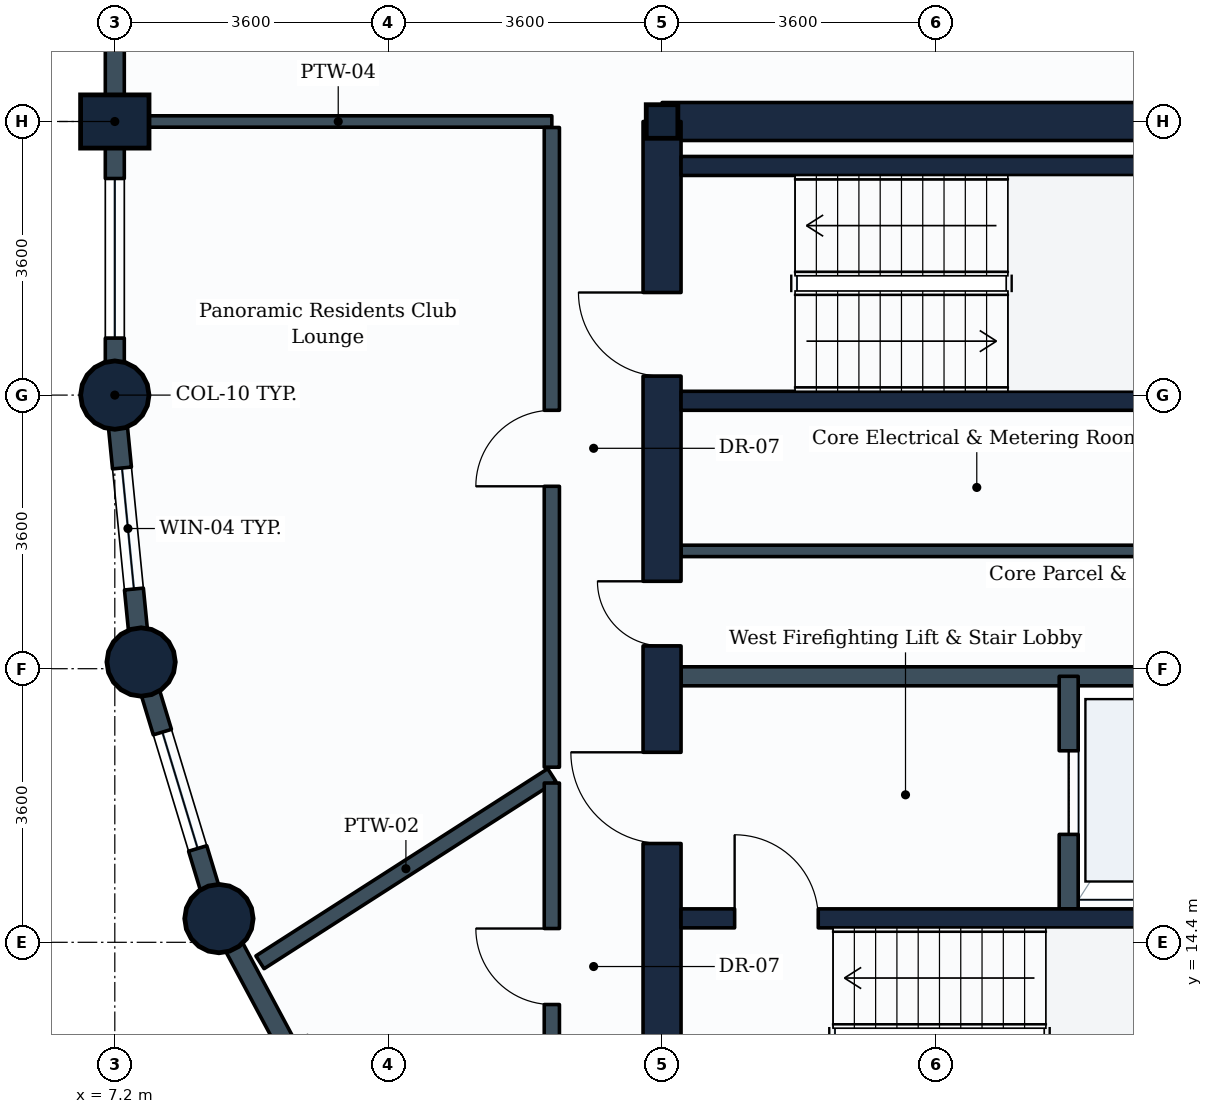
"""IFC4 building model, lengths in metres.
Left out: names, types, materials, properties, quantities, classifications, styles, units other than length and angle.
Written with IfcOpenShell. Run it as: python <this file> out.ifc"""

import sys

from ifc_helpers import new_model, si_unit, direction, frame, frame_2d, origin, origin_2d, place, context, subcontext, project, spatial, rectangle, circle, i_section, extrude, element, fill, save


model = new_model("IFC4")
c1 = context("Model", 3, precision=1e-05, world=origin(), true_north=direction((0.0, 1.0)))
c2 = subcontext(c1, "Body", "Model", "MODEL_VIEW")
j1 = project(units=[si_unit("LENGTHUNIT", "METRE"), si_unit("PLANEANGLEUNIT", "RADIAN")], contexts=[c1])
p1 = place(None, origin())
s1 = spatial("IfcSite", under=j1, at=p1, CompositionType="ELEMENT")
p2 = place(p1, origin())
s2 = spatial("IfcBuilding", under=s1, at=p2, CompositionType="ELEMENT")
p3 = place(p2, frame((0.0, 0.0, 178.6)))
s3 = spatial("IfcBuildingStorey", under=s2, at=p3, CompositionType="ELEMENT", Elevation=178.6)
p4 = place(p3, frame((7.2, 21.6, 0.0), z_axis=(0.0, 0.0, 1.0), x_axis=(1.0, 0.0, 0.0)))
e1 = element("IfcColumn", 1, at=p4, inside=s3, PredefinedType="COLUMN", context=c2, shape_type="SweptSolid", body=[
    extrude(circle(Radius=0.45, at=origin_2d()), origin(), (0.0, 0.0, 1.0), 3.8),
])
p5 = place(p3, frame((7.2, 25.2, 0.0), z_axis=(0.0, 0.0, 1.0), x_axis=(0.0, 1.0, 0.0)))
e2 = element("IfcColumn", 2, at=p5, inside=s3, PredefinedType="COLUMN", context=c2, shape_type="SweptSolid", body=[
    extrude(rectangle(XDim=0.7, YDim=0.9, at=origin_2d()), origin(), (0.0, 0.0, 1.0), 3.8),
])
for number, where, z_axis, x_axis in (
    (3, (7.546, 18.088, 0.0), (0.0, 0.0, 1.0), (1.0, 0.0, 0.0)),
    (4, (8.57, 14.712, 0.0), (0.0, 0.0, 1.0), (1.0, 0.0, 0.0)),
):
    element("IfcColumn", number, at=place(p3, frame(where, z_axis=z_axis, x_axis=x_axis)), inside=s3, PredefinedType="COLUMN", context=c2, shape_type="SweptSolid", body=[
        extrude(circle(Radius=0.45, at=origin_2d()), origin(), (0.0, 0.0, 1.0), 3.8),
    ])
p6 = place(p3, frame((14.4, 25.2, 0.0), z_axis=(0.0, 0.0, 1.0), x_axis=(1.0, 0.0, 0.0)))
e5 = element("IfcColumn", 5, at=p6, inside=s3, PredefinedType="COLUMN", context=c2, shape_type="SweptSolid", body=[
    extrude(i_section(OverallWidth=0.416, OverallDepth=0.442, WebThickness=0.025, FlangeThickness=0.041, FilletRadius=0.015, at=origin_2d()), origin(), (0.0, 0.0, 1.0), 3.8),
])
p7 = place(p3, frame((7.2, 25.2, 0.0), z_axis=(0.0, 0.0, 1.0), x_axis=(0.0, 1.0, 0.0)))
e6 = element("IfcWall", 6, at=p7, inside=s3, PredefinedType="STANDARD", context=c2, shape_type="SweptSolid", body=[
    extrude(rectangle(XDim=3.6, YDim=0.25, at=frame_2d((1.8, 0.0))), origin(), (0.0, 0.0, 1.0), 2.93),
])
p8 = place(p3, frame((7.2, 21.6, 0.0), z_axis=(0.0, 0.0, 1.0), x_axis=(0.0, 1.0, 0.0)))
e7 = element("IfcWall", 7, at=p8, inside=s3, PredefinedType="STANDARD", context=c2, shape_type="SweptSolid", body=[
    extrude(rectangle(XDim=3.6, YDim=0.25, at=frame_2d((1.8, 0.0))), origin(), (0.0, 0.0, 1.0), 2.93),
])
p9 = place(p8, frame((0.75, 0.0, 0.85)))
e8 = element("IfcOpeningElement", 8, at=p9, cuts=e7, PredefinedType="OPENING", context=c2, shape_type="SweptSolid", body=[
    extrude(rectangle(XDim=2.1, YDim=1.35, at=frame_2d((1.05, 0.675))), frame((0.0, 0.135, 0.0), z_axis=(0.0, -1.0, 0.0), x_axis=(1.0, 0.0, 0.0)), (0.0, 0.0, 1.0), 0.27),
])
p10 = place(p3, frame((7.546, 18.088, 0.0), z_axis=(0.0, 0.0, 1.0), x_axis=(-0.09802417461, 0.995184033831, 0.0)))
e9 = element("IfcWall", 9, at=p10, inside=s3, PredefinedType="STANDARD", context=c2, shape_type="SweptSolid", body=[
    extrude(rectangle(XDim=3.529, YDim=0.25, at=frame_2d((1.765, 0.0))), origin(), (0.0, 0.0, 1.0), 2.93),
])
p11 = place(p10, frame((0.965, 0.0, 0.85)))
e10 = element("IfcOpeningElement", 10, at=p11, cuts=e9, PredefinedType="OPENING", context=c2, shape_type="SweptSolid", body=[
    extrude(rectangle(XDim=1.6, YDim=1.35, at=frame_2d((0.8, 0.675))), frame((0.0, 0.135, 0.0), z_axis=(0.0, -1.0, 0.0), x_axis=(1.0, 0.0, 0.0)), (0.0, 0.0, 1.0), 0.27),
])
p12 = place(p3, frame((8.57, 14.712, 0.0), z_axis=(0.0, 0.0, 1.0), x_axis=(-0.290305086481, 0.956934144423, 0.0)))
e11 = element("IfcWall", 11, at=p12, inside=s3, PredefinedType="STANDARD", context=c2, shape_type="SweptSolid", body=[
    extrude(rectangle(XDim=3.528, YDim=0.25, at=frame_2d((1.764, 0.0))), origin(), (0.0, 0.0, 1.0), 2.93),
])
p13 = place(p12, frame((0.964, 0.0, 0.85)))
e12 = element("IfcOpeningElement", 12, at=p13, cuts=e11, PredefinedType="OPENING", context=c2, shape_type="SweptSolid", body=[
    extrude(rectangle(XDim=1.6, YDim=1.35, at=frame_2d((0.8, 0.675))), frame((0.0, 0.135, 0.0), z_axis=(0.0, -1.0, 0.0), x_axis=(1.0, 0.0, 0.0)), (0.0, 0.0, 1.0), 0.27),
])
p14 = place(p3, frame((10.234, 11.6, 0.0), z_axis=(0.0, 0.0, 1.0), x_axis=(-0.47151087309, 0.881860247748, 0.0)))
e13 = element("IfcWall", 13, at=p14, inside=s3, PredefinedType="STANDARD", context=c2, shape_type="SweptSolid", body=[
    extrude(rectangle(XDim=3.529, YDim=0.25, at=frame_2d((1.764, 0.0))), origin(), (0.0, 0.0, 1.0), 2.93),
])
p15 = place(p3, frame((14.4, 25.2, 0.0), z_axis=(0.0, 0.0, 1.0), x_axis=(1.0, 0.0, 0.0)))
e14 = element("IfcWall", 14, at=p15, inside=s3, PredefinedType="SHEAR", context=c2, shape_type="SweptSolid", body=[
    extrude(rectangle(XDim=10.8, YDim=0.5, at=frame_2d((5.4, 0.0))), origin(), (0.0, 0.0, 1.0), 3.55),
])
p16 = place(p3, frame((14.4, 10.8, 0.0), z_axis=(0.0, 0.0, 1.0), x_axis=(0.0, 1.0, 0.0)))
e15 = element("IfcWall", 15, at=p16, inside=s3, PredefinedType="SHEAR", context=c2, shape_type="SweptSolid", body=[
    extrude(rectangle(XDim=14.4, YDim=0.5, at=frame_2d((7.2, 0.0))), origin(), (0.0, 0.0, 1.0), 3.55),
])
p17 = place(p16, frame((11.05, 0.0, 0.0)))
e16 = element("IfcOpeningElement", 16, at=p17, cuts=e15, PredefinedType="OPENING", context=c2, shape_type="SweptSolid", body=[
    extrude(rectangle(XDim=1.1, YDim=2.1, at=frame_2d((0.55, 1.05))), frame((0.0, 0.26, 0.0), z_axis=(0.0, -1.0, 0.0), x_axis=(1.0, 0.0, 0.0)), (0.0, 0.0, 1.0), 0.52),
])
p18 = place(p16, frame((4.9, 0.0, 0.0)))
e17 = element("IfcOpeningElement", 17, at=p18, cuts=e15, PredefinedType="OPENING", context=c2, shape_type="SweptSolid", body=[
    extrude(rectangle(XDim=1.2, YDim=2.1, at=frame_2d((0.6, 1.05))), frame((0.0, 0.26, 0.0), z_axis=(0.0, -1.0, 0.0), x_axis=(1.0, 0.0, 0.0)), (0.0, 0.0, 1.0), 0.52),
])
p19 = place(p16, frame((7.5, 0.0, 0.0)))
e18 = element("IfcOpeningElement", 18, at=p19, cuts=e15, PredefinedType="OPENING", context=c2, shape_type="SweptSolid", body=[
    extrude(rectangle(XDim=0.85, YDim=2.1, at=frame_2d((0.425, 1.05))), frame((0.0, 0.26, 0.0), z_axis=(0.0, -1.0, 0.0), x_axis=(1.0, 0.0, 0.0)), (0.0, 0.0, 1.0), 0.52),
])
p20 = place(p3, frame((14.65, 14.715, 0.0), z_axis=(0.0, 0.0, 1.0), x_axis=(1.0, 0.0, 0.0)))
e19 = element("IfcWall", 19, at=p20, inside=s3, PredefinedType="SHEAR", context=c2, shape_type="SweptSolid", body=[
    extrude(rectangle(XDim=8.7, YDim=0.25, at=frame_2d((4.35, 0.0))), origin(), (0.0, 0.0, 1.0), 3.55),
])
p21 = place(p20, frame((0.705, 0.0, 0.0)))
e20 = element("IfcOpeningElement", 20, at=p21, cuts=e19, PredefinedType="OPENING", context=c2, shape_type="SweptSolid", body=[
    extrude(rectangle(XDim=1.1, YDim=2.1, at=frame_2d((0.55, 1.05))), frame((0.0, 0.135, 0.0), z_axis=(0.0, -1.0, 0.0), x_axis=(1.0, 0.0, 0.0)), (0.0, 0.0, 1.0), 0.27),
])
for number, where, z_axis, x_axis in (
    (21, (14.65, 21.525, 0.0), (0.0, 0.0, 1.0), (1.0, 0.0, 0.0)),
    (22, (14.65, 24.615, 0.0), (0.0, 0.0, 1.0), (1.0, 0.0, 0.0)),
):
    element("IfcWall", number, at=place(p3, frame(where, z_axis=z_axis, x_axis=x_axis)), inside=s3, PredefinedType="SHEAR", context=c2, shape_type="SweptSolid", body=[
        extrude(rectangle(XDim=8.25, YDim=0.25, at=frame_2d((4.125, 0.0))), origin(), (0.0, 0.0, 1.0), 3.55),
    ])
p22 = place(p3, frame((14.65, 17.9, 0.0), z_axis=(0.0, 0.0, 1.0), x_axis=(1.0, 0.0, 0.0)))
e23 = element("IfcWall", 23, at=p22, inside=s3, PredefinedType="PARTITIONING", context=c2, shape_type="SweptSolid", body=[
    extrude(rectangle(XDim=7.15, YDim=0.25, at=frame_2d((3.575, 0.0))), origin(), (0.0, 0.0, 1.0), 3.535),
])
p23 = place(p3, frame((19.75, 14.84, 0.0), z_axis=(0.0, 0.0, 1.0), x_axis=(0.0, 1.0, 0.0)))
e24 = element("IfcWall", 24, at=p23, inside=s3, PredefinedType="PARTITIONING", context=c2, shape_type="SweptSolid", body=[
    extrude(rectangle(XDim=3.06, YDim=0.25, at=frame_2d((1.53, 0.0))), origin(), (0.0, 0.0, 1.0), 3.535),
])
p24 = place(p23, frame((0.98, 0.0, 0.0)))
e25 = element("IfcOpeningElement", 25, at=p24, cuts=e24, PredefinedType="OPENING", context=c2, shape_type="SweptSolid", body=[
    extrude(rectangle(XDim=1.1, YDim=2.1, at=frame_2d((0.55, 1.05))), frame((0.0, 0.135, 0.0), z_axis=(0.0, -1.0, 0.0), x_axis=(1.0, 0.0, 0.0)), (0.0, 0.0, 1.0), 0.27),
])
p25 = place(p3, frame((14.65, 19.55, 0.0), z_axis=(0.0, 0.0, 1.0), x_axis=(1.0, 0.0, 0.0)))
e26 = element("IfcWall", 26, at=p25, inside=s3, PredefinedType="PARTITIONING", context=c2, shape_type="SweptSolid", body=[
    extrude(rectangle(XDim=8.0, YDim=0.15, at=frame_2d((4.0, 0.0))), origin(), (0.0, 0.0, 1.0), 3.535),
])
p26 = place(p3, frame((7.329, 25.2, 0.0), z_axis=(0.0, 0.0, 1.0), x_axis=(1.0, 0.0, 0.0)))
e27 = element("IfcWall", 27, at=p26, inside=s3, PredefinedType="PARTITIONING", context=c2, shape_type="SweptSolid", body=[
    extrude(rectangle(XDim=5.621, YDim=0.15, at=frame_2d((2.811, 0.0))), origin(), (0.0, 0.0, 1.0), 3.535),
])
p27 = place(p3, frame((12.95, 16.6, 0.0), z_axis=(0.0, 0.0, 1.0), x_axis=(-0.841685822078, -0.539967570242, 0.0)))
e28 = element("IfcWall", 28, at=p27, inside=s3, PredefinedType="PARTITIONING", context=c2, shape_type="SweptSolid", body=[
    extrude(rectangle(XDim=4.562, YDim=0.2, at=frame_2d((2.281, 0.0))), origin(), (0.0, 0.0, 1.0), 2.93),
])
p28 = place(p3, frame((12.95, 16.704, 0.0), z_axis=(0.0, 0.0, 1.0), x_axis=(0.0, 1.0, 0.0)))
e29 = element("IfcWall", 29, at=p28, inside=s3, PredefinedType="PARTITIONING", context=c2, shape_type="SweptSolid", body=[
    extrude(rectangle(XDim=8.417, YDim=0.2, at=frame_2d((4.208, 0.0))), origin(), (0.0, 0.0, 1.0), 3.22),
])
p29 = place(p28, frame((3.696, 0.0, 0.0)))
e30 = element("IfcOpeningElement", 30, at=p29, cuts=e29, PredefinedType="OPENING", context=c2, shape_type="SweptSolid", body=[
    extrude(rectangle(XDim=1.0, YDim=2.1, at=frame_2d((0.5, 1.05))), frame((0.0, 0.11, 0.0), z_axis=(0.0, -1.0, 0.0), x_axis=(1.0, 0.0, 0.0)), (0.0, 0.0, 1.0), 0.22),
])
p30 = place(p3, frame((12.95, 9.623, 0.0), z_axis=(0.0, 0.0, 1.0), x_axis=(0.0, 1.0, 0.0)))
e31 = element("IfcWall", 31, at=p30, inside=s3, PredefinedType="PARTITIONING", context=c2, shape_type="SweptSolid", body=[
    extrude(rectangle(XDim=6.873, YDim=0.2, at=frame_2d((3.437, 0.0))), origin(), (0.0, 0.0, 1.0), 3.17),
])
p31 = place(p30, frame((3.958, 0.0, 0.0)))
e32 = element("IfcOpeningElement", 32, at=p31, cuts=e31, PredefinedType="OPENING", context=c2, shape_type="SweptSolid", body=[
    extrude(rectangle(XDim=1.0, YDim=2.1, at=frame_2d((0.5, 1.05))), frame((0.0, 0.11, 0.0), z_axis=(0.0, -1.0, 0.0), x_axis=(1.0, 0.0, 0.0)), (0.0, 0.0, 1.0), 0.22),
])
p32 = place(p9, origin())
e33 = element("IfcWindow", 33, at=p32, inside=s3, PartitioningType="SINGLE_PANEL", PredefinedType="WINDOW", context=c2, shape_type="SweptSolid", body=[
    extrude(rectangle(XDim=2.1, YDim=1.35, at=frame_2d((1.05, 0.675))), frame((0.0, 0.03, 0.0), z_axis=(0.0, -1.0, 0.0), x_axis=(1.0, 0.0, 0.0)), (0.0, 0.0, 1.0), 0.06),
])
fill(e8, e33)
p33 = place(p11, origin())
e34 = element("IfcWindow", 34, at=p33, inside=s3, PartitioningType="SINGLE_PANEL", PredefinedType="WINDOW", context=c2, shape_type="SweptSolid", body=[
    extrude(rectangle(XDim=1.6, YDim=1.35, at=frame_2d((0.8, 0.675))), frame((0.0, 0.03, 0.0), z_axis=(0.0, -1.0, 0.0), x_axis=(1.0, 0.0, 0.0)), (0.0, 0.0, 1.0), 0.06),
])
fill(e10, e34)
p34 = place(p13, origin())
e35 = element("IfcWindow", 35, at=p34, inside=s3, PartitioningType="SINGLE_PANEL", PredefinedType="WINDOW", context=c2, shape_type="SweptSolid", body=[
    extrude(rectangle(XDim=1.6, YDim=1.35, at=frame_2d((0.8, 0.675))), frame((0.0, 0.03, 0.0), z_axis=(0.0, -1.0, 0.0), x_axis=(1.0, 0.0, 0.0)), (0.0, 0.0, 1.0), 0.06),
])
fill(e12, e35)
p35 = place(p21, origin())
e36 = element("IfcDoor", 36, at=p35, inside=s3, OperationType="SINGLE_SWING_LEFT", PredefinedType="DOOR", context=c2, shape_type="SweptSolid", body=[
    extrude(rectangle(XDim=1.1, YDim=2.1, at=frame_2d((0.55, 1.05))), frame((0.0, 0.025, 0.0), z_axis=(0.0, -1.0, 0.0), x_axis=(1.0, 0.0, 0.0)), (0.0, 0.0, 1.0), 0.05),
])
fill(e20, e36)
p36 = place(p17, origin())
e37 = element("IfcDoor", 37, at=p36, inside=s3, OperationType="SINGLE_SWING_RIGHT", PredefinedType="DOOR", context=c2, shape_type="SweptSolid", body=[
    extrude(rectangle(XDim=1.1, YDim=2.1, at=frame_2d((0.55, 1.05))), frame((0.0, 0.025, 0.0), z_axis=(0.0, -1.0, 0.0), x_axis=(1.0, 0.0, 0.0)), (0.0, 0.0, 1.0), 0.05),
])
fill(e16, e37)
p37 = place(p24, origin())
e38 = element("IfcDoor", 38, at=p37, inside=s3, OperationType="SLIDING_TO_LEFT", PredefinedType="DOOR", context=c2, shape_type="SweptSolid", body=[
    extrude(rectangle(XDim=1.1, YDim=2.1, at=frame_2d((0.55, 1.05))), frame((0.0, 0.025, 0.0), z_axis=(0.0, -1.0, 0.0), x_axis=(1.0, 0.0, 0.0)), (0.0, 0.0, 1.0), 0.05),
])
fill(e25, e38)
p38 = place(p18, origin())
e39 = element("IfcDoor", 39, at=p38, inside=s3, OperationType="SINGLE_SWING_RIGHT", PredefinedType="DOOR", context=c2, shape_type="SweptSolid", body=[
    extrude(rectangle(XDim=1.2, YDim=2.1, at=frame_2d((0.6, 1.05))), frame((0.0, 0.025, 0.0), z_axis=(0.0, -1.0, 0.0), x_axis=(1.0, 0.0, 0.0)), (0.0, 0.0, 1.0), 0.05),
])
fill(e17, e39)
p39 = place(p19, origin())
e40 = element("IfcDoor", 40, at=p39, inside=s3, OperationType="SINGLE_SWING_RIGHT", PredefinedType="DOOR", context=c2, shape_type="SweptSolid", body=[
    extrude(rectangle(XDim=0.85, YDim=2.1, at=frame_2d((0.425, 1.05))), frame((0.0, 0.025, 0.0), z_axis=(0.0, -1.0, 0.0), x_axis=(1.0, 0.0, 0.0)), (0.0, 0.0, 1.0), 0.05),
])
fill(e18, e40)
p40 = place(p29, origin())
e41 = element("IfcDoor", 41, at=p40, inside=s3, OperationType="SINGLE_SWING_LEFT", PredefinedType="DOOR", context=c2, shape_type="SweptSolid", body=[
    extrude(rectangle(XDim=1.0, YDim=2.1, at=frame_2d((0.5, 1.05))), frame((0.0, 0.025, 0.0), z_axis=(0.0, -1.0, 0.0), x_axis=(1.0, 0.0, 0.0)), (0.0, 0.0, 1.0), 0.05),
])
fill(e30, e41)
p41 = place(p31, origin())
e42 = element("IfcDoor", 42, at=p41, inside=s3, OperationType="SINGLE_SWING_RIGHT", PredefinedType="DOOR", context=c2, shape_type="SweptSolid", body=[
    extrude(rectangle(XDim=1.0, YDim=2.1, at=frame_2d((0.5, 1.05))), frame((0.0, 0.025, 0.0), z_axis=(0.0, -1.0, 0.0), x_axis=(1.0, 0.0, 0.0)), (0.0, 0.0, 1.0), 0.05),
])
fill(e32, e42)
save(model, sys.argv[1])
